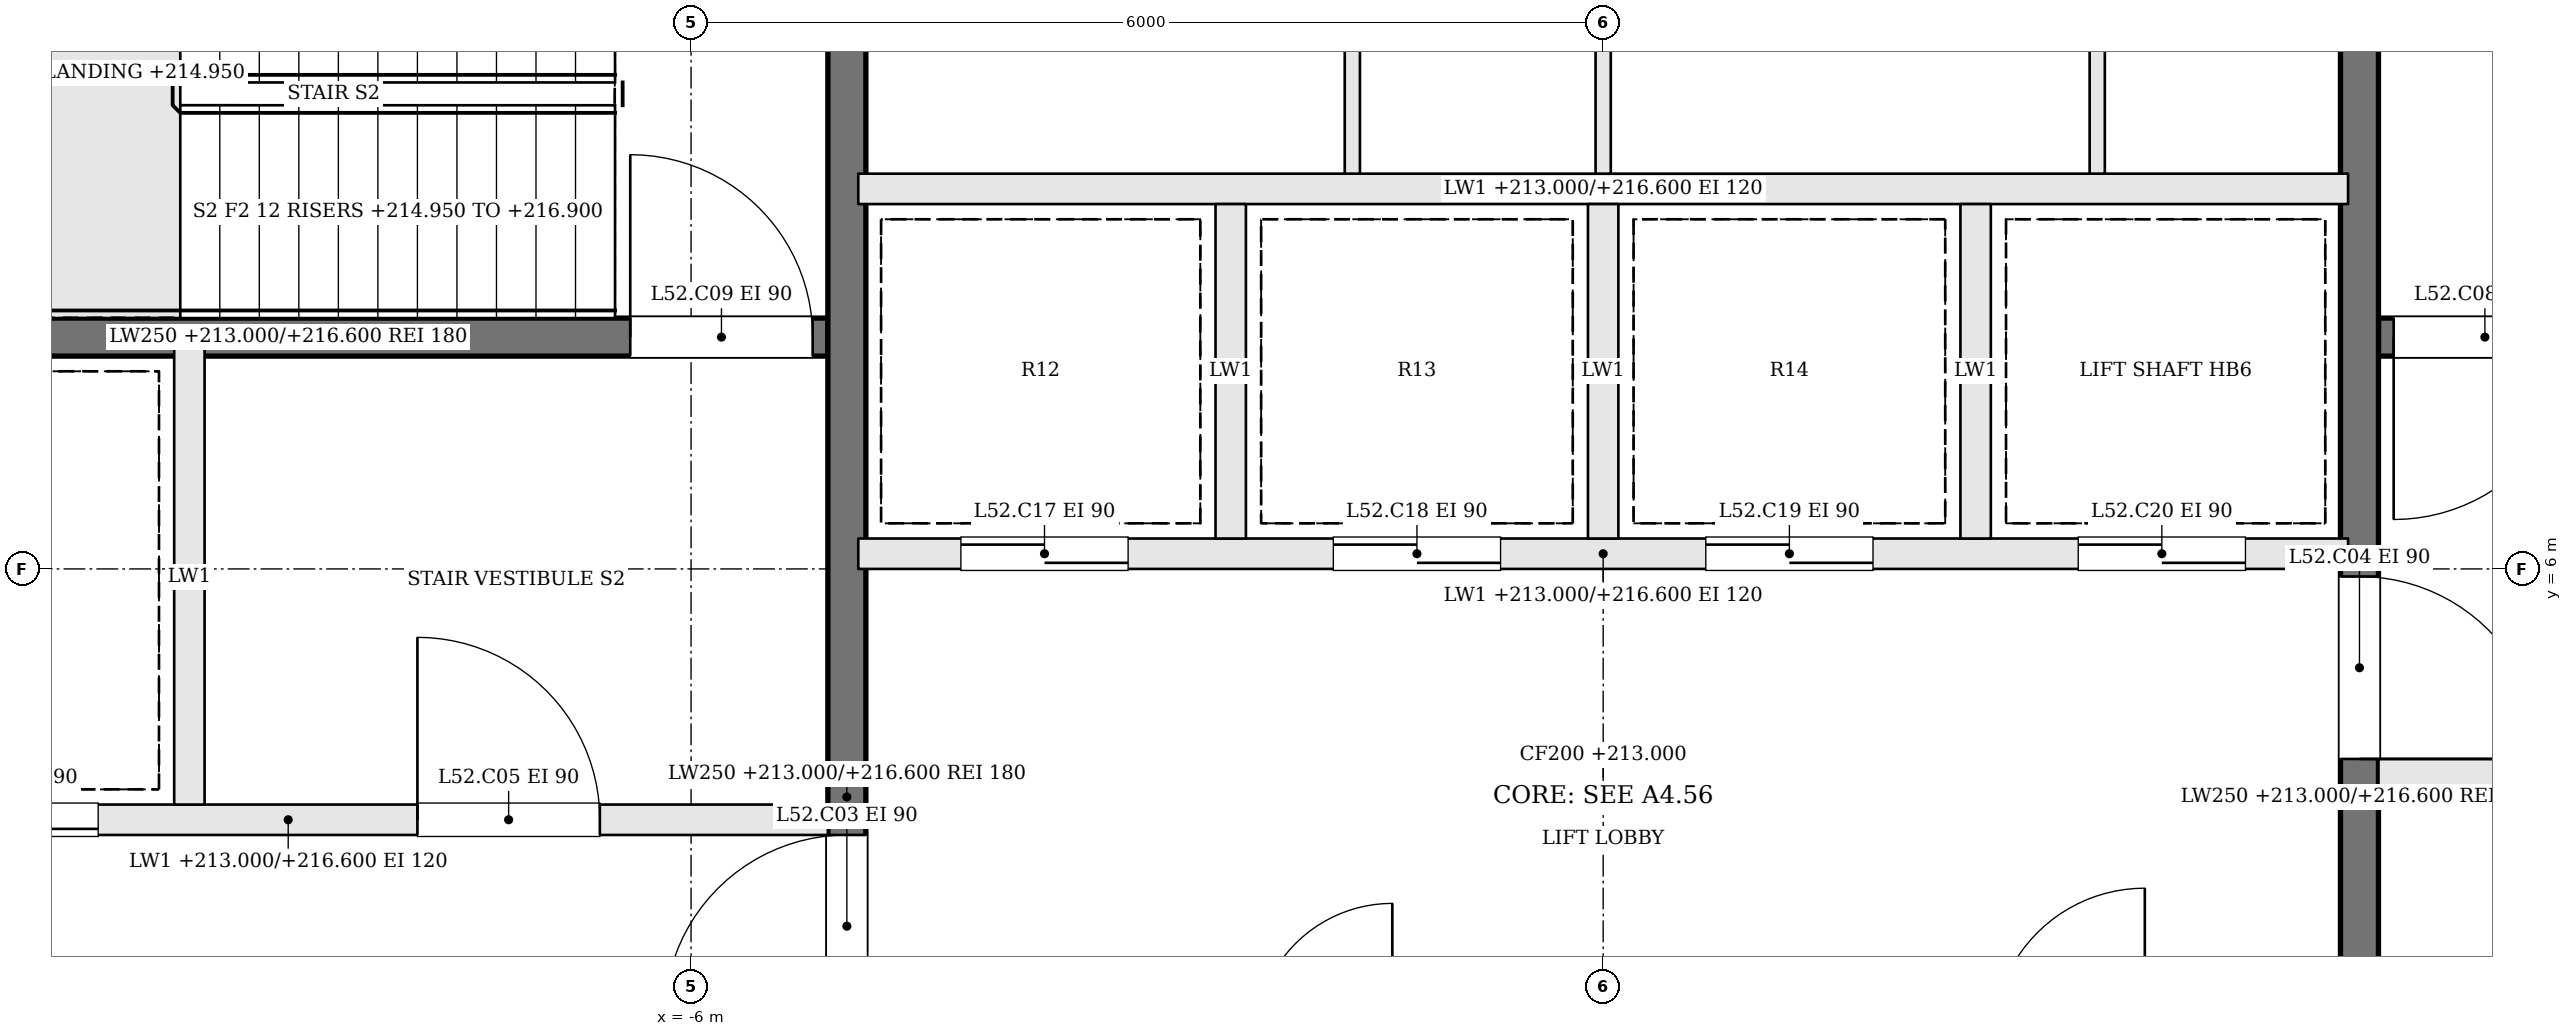
"""IFC4 building model, lengths in metres.
Left out: names, types, materials, properties, quantities, classifications, styles, units other than length and angle.
Written with IfcOpenShell. Run it as: python <this file> out.ifc"""

import sys

from ifc_helpers import new_model, si_unit, direction, frame, frame_2d, origin, place, context, subcontext, project, spatial, rectangle, extrude, element, fill, save


model = new_model("IFC4")
c1 = context("Model", 3, precision=1e-05, world=origin(), true_north=direction((0.0, 1.0)))
c2 = subcontext(c1, "Body", "Model", "MODEL_VIEW")
j1 = project(units=[si_unit("LENGTHUNIT", "METRE"), si_unit("PLANEANGLEUNIT", "RADIAN")], contexts=[c1])
p1 = place(None, origin())
s1 = spatial("IfcSite", under=j1, at=p1, CompositionType="ELEMENT")
p2 = place(p1, origin())
s2 = spatial("IfcBuilding", under=s1, at=p2, CompositionType="ELEMENT")
p3 = place(p2, frame((0.0, 0.0, 213.0)))
s3 = spatial("IfcBuildingStorey", under=s2, at=p3, CompositionType="ELEMENT", Elevation=213.0)
p4 = place(p3, frame((12.2, 7.525, 0.0), z_axis=(0.0, 0.0, 1.0), x_axis=(-1.0, 0.0, 0.0)))
e1 = element("IfcWall", 1, at=p4, inside=s3, PredefinedType="SOLIDWALL", context=c2, shape_type="SweptSolid", body=[
    extrude(rectangle(XDim=7.1, YDim=0.25, at=frame_2d((3.55, 0.0))), origin(), (0.0, 0.0, 1.0), 3.6),
])
p5 = place(p4, frame((5.8, 0.0, 0.0)))
e2 = element("IfcOpeningElement", 2, at=p5, cuts=e1, PredefinedType="OPENING", context=c2, shape_type="SweptSolid", body=[
    extrude(rectangle(XDim=1.2, YDim=2.1, at=frame_2d((0.6, 1.05))), frame((0.0, 0.135, 0.0), z_axis=(0.0, -1.0, 0.0), x_axis=(1.0, 0.0, 0.0)), (0.0, 0.0, 1.0), 0.27),
])
p6 = place(p3, frame((-12.2, 4.35, 0.0), z_axis=(0.0, 0.0, 1.0), x_axis=(1.0, 0.0, 0.0)))
e3 = element("IfcWall", 3, at=p6, inside=s3, PredefinedType="SOLIDWALL", context=c2, shape_type="SweptSolid", body=[
    extrude(rectangle(XDim=7.1, YDim=0.2, at=frame_2d((3.55, 0.0))), origin(), (0.0, 0.0, 1.0), 3.6),
])
p7 = place(p6, frame((4.4, 0.0, 0.0)))
e4 = element("IfcOpeningElement", 4, at=p7, cuts=e3, PredefinedType="OPENING", context=c2, shape_type="SweptSolid", body=[
    extrude(rectangle(XDim=1.2, YDim=2.1, at=frame_2d((0.6, 1.05))), frame((0.0, 0.11, 0.0), z_axis=(0.0, -1.0, 0.0), x_axis=(1.0, 0.0, 0.0)), (0.0, 0.0, 1.0), 0.22),
])
p8 = place(p6, frame((1.1, 0.0, 0.0)))
e5 = element("IfcOpeningElement", 5, at=p8, cuts=e3, PredefinedType="OPENING", context=c2, shape_type="SweptSolid", body=[
    extrude(rectangle(XDim=1.2, YDim=2.1, at=frame_2d((0.6, 1.05))), frame((0.0, 0.11, 0.0), z_axis=(0.0, -1.0, 0.0), x_axis=(1.0, 0.0, 0.0)), (0.0, 0.0, 1.0), 0.22),
])
p9 = place(p3, frame((12.2, 4.65, 0.0), z_axis=(0.0, 0.0, 1.0), x_axis=(-1.0, 0.0, 0.0)))
e6 = element("IfcWall", 6, at=p9, inside=s3, PredefinedType="SOLIDWALL", context=c2, shape_type="SweptSolid", body=[
    extrude(rectangle(XDim=7.1, YDim=0.2, at=frame_2d((3.55, 0.0))), origin(), (0.0, 0.0, 1.0), 3.6),
])
p10 = place(p9, frame((4.4, 0.0, 0.0)))
e7 = element("IfcOpeningElement", 7, at=p10, cuts=e6, PredefinedType="OPENING", context=c2, shape_type="SweptSolid", body=[
    extrude(rectangle(XDim=1.2, YDim=2.1, at=frame_2d((0.6, 1.05))), frame((0.0, 0.11, 0.0), z_axis=(0.0, -1.0, 0.0), x_axis=(1.0, 0.0, 0.0)), (0.0, 0.0, 1.0), 0.22),
])
p11 = place(p9, frame((1.1, 0.0, 0.0)))
e8 = element("IfcOpeningElement", 8, at=p11, cuts=e6, PredefinedType="OPENING", context=c2, shape_type="SweptSolid", body=[
    extrude(rectangle(XDim=1.2, YDim=2.1, at=frame_2d((0.6, 1.05))), frame((0.0, 0.11, 0.0), z_axis=(0.0, -1.0, 0.0), x_axis=(1.0, 0.0, 0.0)), (0.0, 0.0, 1.0), 0.22),
])
p12 = place(p3, frame((-12.2, 7.525, 0.0), z_axis=(0.0, 0.0, 1.0), x_axis=(1.0, 0.0, 0.0)))
e9 = element("IfcWall", 9, at=p12, inside=s3, PredefinedType="SOLIDWALL", context=c2, shape_type="SweptSolid", body=[
    extrude(rectangle(XDim=7.1, YDim=0.25, at=frame_2d((3.55, 0.0))), origin(), (0.0, 0.0, 1.0), 3.6),
])
p13 = place(p12, frame((5.8, 0.0, 0.0)))
e10 = element("IfcOpeningElement", 10, at=p13, cuts=e9, PredefinedType="OPENING", context=c2, shape_type="SweptSolid", body=[
    extrude(rectangle(XDim=1.2, YDim=2.1, at=frame_2d((0.6, 1.05))), frame((0.0, 0.135, 0.0), z_axis=(0.0, -1.0, 0.0), x_axis=(1.0, 0.0, 0.0)), (0.0, 0.0, 1.0), 0.27),
])
p14 = place(p3, frame((-9.3, 4.45, 0.0), z_axis=(0.0, 0.0, 1.0), x_axis=(0.0, 1.0, 0.0)))
e11 = element("IfcWall", 11, at=p14, inside=s3, PredefinedType="SOLIDWALL", context=c2, shape_type="SweptSolid", body=[
    extrude(rectangle(XDim=3.0, YDim=0.2, at=frame_2d((1.5, 0.0))), origin(), (0.0, 0.0, 1.0), 3.6),
])
p15 = place(p3, frame((-4.975, -2.2, 0.0), z_axis=(0.0, 0.0, 1.0), x_axis=(0.0, 1.0, 0.0)))
e12 = element("IfcWall", 12, at=p15, inside=s3, PredefinedType="SOLIDWALL", context=c2, shape_type="SweptSolid", body=[
    extrude(rectangle(XDim=13.4, YDim=0.25, at=frame_2d((6.7, 0.0))), origin(), (0.0, 0.0, 1.0), 3.6),
])
p16 = place(p15, frame((5.25, 0.0, 0.0)))
e13 = element("IfcOpeningElement", 13, at=p16, cuts=e12, PredefinedType="OPENING", context=c2, shape_type="SweptSolid", body=[
    extrude(rectangle(XDim=1.2, YDim=2.1, at=frame_2d((0.6, 1.05))), frame((0.0, 0.135, 0.0), z_axis=(0.0, -1.0, 0.0), x_axis=(1.0, 0.0, 0.0)), (0.0, 0.0, 1.0), 0.27),
])
p17 = place(p3, frame((4.975, 11.2, 0.0), z_axis=(0.0, 0.0, 1.0), x_axis=(0.0, -1.0, 0.0)))
e14 = element("IfcWall", 14, at=p17, inside=s3, PredefinedType="SOLIDWALL", context=c2, shape_type="SweptSolid", body=[
    extrude(rectangle(XDim=13.4, YDim=0.25, at=frame_2d((6.7, 0.0))), origin(), (0.0, 0.0, 1.0), 3.6),
])
p18 = place(p17, frame((5.25, 0.0, 0.0)))
e15 = element("IfcOpeningElement", 15, at=p18, cuts=e14, PredefinedType="OPENING", context=c2, shape_type="SweptSolid", body=[
    extrude(rectangle(XDim=1.2, YDim=2.1, at=frame_2d((0.6, 1.05))), frame((0.0, 0.135, 0.0), z_axis=(0.0, -1.0, 0.0), x_axis=(1.0, 0.0, 0.0)), (0.0, 0.0, 1.0), 0.27),
])
p19 = place(p3, frame((-4.9, 6.1, 0.0), z_axis=(0.0, 0.0, 1.0), x_axis=(1.0, 0.0, 0.0)))
e16 = element("IfcWall", 16, at=p19, inside=s3, PredefinedType="SOLIDWALL", context=c2, shape_type="SweptSolid", body=[
    extrude(rectangle(XDim=9.8, YDim=0.2, at=frame_2d((4.9, 0.0))), origin(), (0.0, 0.0, 1.0), 3.6),
])
p20 = place(p19, frame((0.675, 0.0, 0.0)))
e17 = element("IfcOpeningElement", 17, at=p20, cuts=e16, PredefinedType="OPENING", context=c2, shape_type="SweptSolid", body=[
    extrude(rectangle(XDim=1.1, YDim=2.1, at=frame_2d((0.55, 1.05))), frame((0.0, 0.11, 0.0), z_axis=(0.0, -1.0, 0.0), x_axis=(1.0, 0.0, 0.0)), (0.0, 0.0, 1.0), 0.22),
])
p21 = place(p19, frame((3.125, 0.0, 0.0)))
e18 = element("IfcOpeningElement", 18, at=p21, cuts=e16, PredefinedType="OPENING", context=c2, shape_type="SweptSolid", body=[
    extrude(rectangle(XDim=1.1, YDim=2.1, at=frame_2d((0.55, 1.05))), frame((0.0, 0.11, 0.0), z_axis=(0.0, -1.0, 0.0), x_axis=(1.0, 0.0, 0.0)), (0.0, 0.0, 1.0), 0.22),
])
p22 = place(p19, frame((5.575, 0.0, 0.0)))
e19 = element("IfcOpeningElement", 19, at=p22, cuts=e16, PredefinedType="OPENING", context=c2, shape_type="SweptSolid", body=[
    extrude(rectangle(XDim=1.1, YDim=2.1, at=frame_2d((0.55, 1.05))), frame((0.0, 0.11, 0.0), z_axis=(0.0, -1.0, 0.0), x_axis=(1.0, 0.0, 0.0)), (0.0, 0.0, 1.0), 0.22),
])
p23 = place(p19, frame((8.025, 0.0, 0.0)))
e20 = element("IfcOpeningElement", 20, at=p23, cuts=e16, PredefinedType="OPENING", context=c2, shape_type="SweptSolid", body=[
    extrude(rectangle(XDim=1.1, YDim=2.1, at=frame_2d((0.55, 1.05))), frame((0.0, 0.11, 0.0), z_axis=(0.0, -1.0, 0.0), x_axis=(1.0, 0.0, 0.0)), (0.0, 0.0, 1.0), 0.22),
])
p24 = place(p3, frame((-4.9, 8.5, 0.0), z_axis=(0.0, 0.0, 1.0), x_axis=(1.0, 0.0, 0.0)))
e21 = element("IfcWall", 21, at=p24, inside=s3, PredefinedType="SOLIDWALL", context=c2, shape_type="SweptSolid", body=[
    extrude(rectangle(XDim=9.8, YDim=0.2, at=frame_2d((4.9, 0.0))), origin(), (0.0, 0.0, 1.0), 3.6),
])
for number, where, z_axis, x_axis in (
    (22, (-2.45, 6.2, 0.0), (0.0, 0.0, 1.0), (0.0, 1.0, 0.0)),
    (23, (0.0, 6.2, 0.0), (0.0, 0.0, 1.0), (0.0, 1.0, 0.0)),
    (24, (2.45, 6.2, 0.0), (0.0, 0.0, 1.0), (0.0, 1.0, 0.0)),
):
    element("IfcWall", number, at=place(p3, frame(where, z_axis=z_axis, x_axis=x_axis)), inside=s3, PredefinedType="SOLIDWALL", context=c2, shape_type="SweptSolid", body=[
        extrude(rectangle(XDim=2.2, YDim=0.2, at=frame_2d((1.1, 0.0))), origin(), (0.0, 0.0, 1.0), 3.6),
    ])
for number, where, z_axis, x_axis in (
    (25, (-1.65, 8.6, 0.0), (0.0, 0.0, 1.0), (0.0, 1.0, 0.0)),
    (26, (0.0, 8.6, 0.0), (0.0, 0.0, 1.0), (0.0, 1.0, 0.0)),
    (27, (3.25, 8.6, 0.0), (0.0, 0.0, 1.0), (0.0, 1.0, 0.0)),
):
    element("IfcWall", number, at=place(p3, frame(where, z_axis=z_axis, x_axis=x_axis)), inside=s3, PredefinedType="PARTITIONING", context=c2, shape_type="SweptSolid", body=[
        extrude(rectangle(XDim=2.6, YDim=0.1, at=frame_2d((1.3, 0.0))), origin(), (0.0, 0.0, 1.0), 3.6),
    ])
p25 = place(p16, origin())
e28 = element("IfcDoor", 28, at=p25, inside=s3, OperationType="SINGLE_SWING_LEFT", PredefinedType="DOOR", context=c2, shape_type="SweptSolid", body=[
    extrude(rectangle(XDim=1.2, YDim=2.1, at=frame_2d((0.6, 1.05))), frame((0.0, 0.025, 0.0), z_axis=(0.0, -1.0, 0.0), x_axis=(1.0, 0.0, 0.0)), (0.0, 0.0, 1.0), 0.05),
])
fill(e13, e28)
p26 = place(p18, origin())
e29 = element("IfcDoor", 29, at=p26, inside=s3, OperationType="SINGLE_SWING_RIGHT", PredefinedType="DOOR", context=c2, shape_type="SweptSolid", body=[
    extrude(rectangle(XDim=1.2, YDim=2.1, at=frame_2d((0.6, 1.05))), frame((0.0, 0.025, 0.0), z_axis=(0.0, -1.0, 0.0), x_axis=(1.0, 0.0, 0.0)), (0.0, 0.0, 1.0), 0.05),
])
fill(e15, e29)
p27 = place(p7, origin())
e30 = element("IfcDoor", 30, at=p27, inside=s3, OperationType="SINGLE_SWING_LEFT", PredefinedType="DOOR", context=c2, shape_type="SweptSolid", body=[
    extrude(rectangle(XDim=1.2, YDim=2.1, at=frame_2d((0.6, 1.05))), frame((0.0, 0.025, 0.0), z_axis=(0.0, -1.0, 0.0), x_axis=(1.0, 0.0, 0.0)), (0.0, 0.0, 1.0), 0.05),
])
fill(e4, e30)
p28 = place(p5, origin())
e31 = element("IfcDoor", 31, at=p28, inside=s3, OperationType="SINGLE_SWING_RIGHT", PredefinedType="DOOR", context=c2, shape_type="SweptSolid", body=[
    extrude(rectangle(XDim=1.2, YDim=2.1, at=frame_2d((0.6, 1.05))), frame((0.0, 0.025, 0.0), z_axis=(0.0, -1.0, 0.0), x_axis=(1.0, 0.0, 0.0)), (0.0, 0.0, 1.0), 0.05),
])
fill(e2, e31)
p29 = place(p13, origin())
e32 = element("IfcDoor", 32, at=p29, inside=s3, OperationType="SINGLE_SWING_LEFT", PredefinedType="DOOR", context=c2, shape_type="SweptSolid", body=[
    extrude(rectangle(XDim=1.2, YDim=2.1, at=frame_2d((0.6, 1.05))), frame((0.0, 0.025, 0.0), z_axis=(0.0, -1.0, 0.0), x_axis=(1.0, 0.0, 0.0)), (0.0, 0.0, 1.0), 0.05),
])
fill(e10, e32)
p30 = place(p8, origin())
e33 = element("IfcDoor", 33, at=p30, inside=s3, OperationType="SLIDING_TO_RIGHT", PredefinedType="DOOR", context=c2, shape_type="SweptSolid", body=[
    extrude(rectangle(XDim=1.2, YDim=2.1, at=frame_2d((0.6, 1.05))), frame((0.0, 0.025, 0.0), z_axis=(0.0, -1.0, 0.0), x_axis=(1.0, 0.0, 0.0)), (0.0, 0.0, 1.0), 0.05),
])
fill(e5, e33)
p31 = place(p20, origin())
e34 = element("IfcDoor", 34, at=p31, inside=s3, OperationType="SLIDING_TO_RIGHT", PredefinedType="DOOR", context=c2, shape_type="SweptSolid", body=[
    extrude(rectangle(XDim=1.1, YDim=2.1, at=frame_2d((0.55, 1.05))), frame((0.0, 0.025, 0.0), z_axis=(0.0, -1.0, 0.0), x_axis=(1.0, 0.0, 0.0)), (0.0, 0.0, 1.0), 0.05),
])
fill(e17, e34)
p32 = place(p21, origin())
e35 = element("IfcDoor", 35, at=p32, inside=s3, OperationType="SLIDING_TO_LEFT", PredefinedType="DOOR", context=c2, shape_type="SweptSolid", body=[
    extrude(rectangle(XDim=1.1, YDim=2.1, at=frame_2d((0.55, 1.05))), frame((0.0, 0.025, 0.0), z_axis=(0.0, -1.0, 0.0), x_axis=(1.0, 0.0, 0.0)), (0.0, 0.0, 1.0), 0.05),
])
fill(e18, e35)
p33 = place(p22, origin())
e36 = element("IfcDoor", 36, at=p33, inside=s3, OperationType="SLIDING_TO_RIGHT", PredefinedType="DOOR", context=c2, shape_type="SweptSolid", body=[
    extrude(rectangle(XDim=1.1, YDim=2.1, at=frame_2d((0.55, 1.05))), frame((0.0, 0.025, 0.0), z_axis=(0.0, -1.0, 0.0), x_axis=(1.0, 0.0, 0.0)), (0.0, 0.0, 1.0), 0.05),
])
fill(e19, e36)
p34 = place(p23, origin())
e37 = element("IfcDoor", 37, at=p34, inside=s3, OperationType="SLIDING_TO_LEFT", PredefinedType="DOOR", context=c2, shape_type="SweptSolid", body=[
    extrude(rectangle(XDim=1.1, YDim=2.1, at=frame_2d((0.55, 1.05))), frame((0.0, 0.025, 0.0), z_axis=(0.0, -1.0, 0.0), x_axis=(1.0, 0.0, 0.0)), (0.0, 0.0, 1.0), 0.05),
])
fill(e20, e37)
save(model, sys.argv[1])
